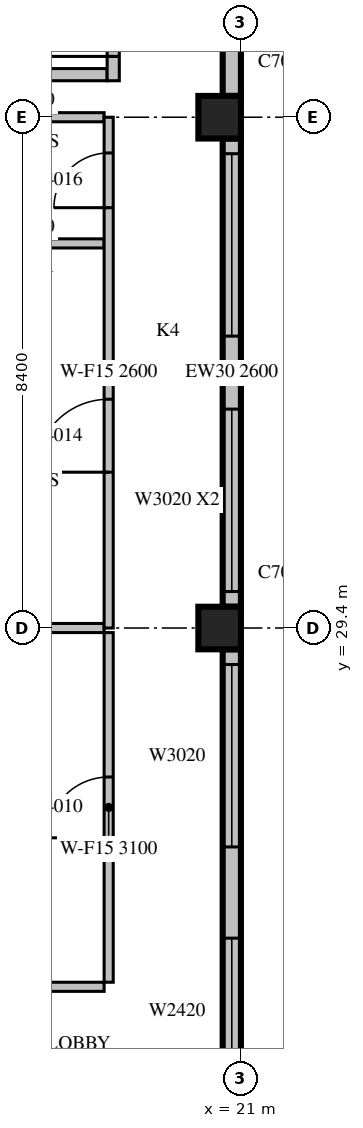
"""IFC4 building model, lengths in metres.
Left out: names, types, materials, properties, quantities, classifications, styles, units other than length and angle.
Written with IfcOpenShell. Run it as: python <this file> out.ifc"""

import sys

from ifc_helpers import new_model, si_unit, direction, frame, frame_2d, origin, origin_2d, place, context, subcontext, project, spatial, rectangle, extrude, source, transform, mapped, element, fill, save


model = new_model("IFC4")
c1 = context("Model", 3, precision=1e-05, world=origin(), true_north=direction((0.0, 1.0)))
c2 = subcontext(c1, "Body", "Model", "MODEL_VIEW")
j1 = project(units=[si_unit("LENGTHUNIT", "METRE"), si_unit("PLANEANGLEUNIT", "RADIAN")], contexts=[c1])
p1 = place(None, origin())
s1 = spatial("IfcSite", under=j1, at=p1, CompositionType="ELEMENT")
p2 = place(p1, origin())
s2 = spatial("IfcBuilding", under=s1, at=p2, CompositionType="ELEMENT")
p3 = place(p2, frame((0.0, 0.0, 284.5)))
s3 = spatial("IfcBuildingStorey", under=s2, at=p3, CompositionType="ELEMENT", Elevation=284.5)
m1 = source(origin(), c2, "Body", "SweptSolid", [
    extrude(rectangle(XDim=0.7, YDim=0.7, at=origin_2d()), origin(), (0.0, 0.0, 1.0), 3.5),
])
for number, where, z_axis, x_axis in (
    (1, (20.65, 29.4, 0.0), (0.0, 0.0, 1.0), (1.0, 0.0, 0.0)),
    (2, (20.65, 37.8, 0.0), (0.0, 0.0, 1.0), (1.0, 0.0, 0.0)),
):
    element("IfcColumn", number, at=place(p3, frame(where, z_axis=z_axis, x_axis=x_axis)), inside=s3, PredefinedType="COLUMN", context=c2, shape_type="MappedRepresentation", body=[
        mapped(m1, transform((0.0, 0.0, 0.0), scale=1.0)),
    ])
m2 = source(origin(), c2, "Body", "SweptSolid", [
    extrude(rectangle(XDim=7.45, YDim=0.3, at=frame_2d((3.725, 0.0))), origin(), (0.0, 0.0, 1.0), 3.1),
])
p4 = place(p3, frame((20.85, 21.6, 0.0), z_axis=(0.0, 0.0, 1.0), x_axis=(0.0, 1.0, 0.0)))
e3 = element("IfcWall", 3, at=p4, inside=s3, PredefinedType="STANDARD", context=c2, shape_type="MappedRepresentation", body=[
    mapped(m2, transform((0.0, 0.0, 0.0), scale=1.0)),
])
m3 = source(origin(), c2, "Body", "SweptSolid", [
    extrude(rectangle(XDim=2.4, YDim=2.0, at=frame_2d((1.2, 1.0))), frame((0.0, 0.16, 0.0), z_axis=(0.0, -1.0, 0.0), x_axis=(1.0, 0.0, 0.0)), (0.0, 0.0, 1.0), 0.32),
])
p5 = place(p4, frame((0.3, 0.0, 0.6)))
e4 = element("IfcOpeningElement", 4, at=p5, cuts=e3, PredefinedType="OPENING", context=c2, shape_type="MappedRepresentation", body=[
    mapped(m3, transform((0.0, 0.0, 0.0), scale=1.0)),
])
m4 = source(origin(), c2, "Body", "SweptSolid", [
    extrude(rectangle(XDim=3.0, YDim=2.0, at=frame_2d((1.5, 1.0))), frame((0.0, 0.16, 0.0), z_axis=(0.0, -1.0, 0.0), x_axis=(1.0, 0.0, 0.0)), (0.0, 0.0, 1.0), 0.32),
])
p6 = place(p4, frame((4.2, 0.0, 0.6)))
e5 = element("IfcOpeningElement", 5, at=p6, cuts=e3, PredefinedType="OPENING", context=c2, shape_type="MappedRepresentation", body=[
    mapped(m4, transform((0.0, 0.0, 0.0), scale=1.0)),
])
p7 = place(p3, frame((20.85, 29.75, 0.0), z_axis=(0.0, 0.0, 1.0), x_axis=(0.0, 1.0, 0.0)))
e6 = element("IfcWall", 6, at=p7, inside=s3, PredefinedType="STANDARD", context=c2, shape_type="SweptSolid", body=[
    extrude(rectangle(XDim=7.7, YDim=0.3, at=frame_2d((3.85, 0.0))), origin(), (0.0, 0.0, 1.0), 2.6),
])
p8 = place(p7, frame((0.25, 0.0, 0.6)))
e7 = element("IfcOpeningElement", 7, at=p8, cuts=e6, PredefinedType="OPENING", context=c2, shape_type="MappedRepresentation", body=[
    mapped(m4, transform((0.0, 0.0, 0.0), scale=1.0)),
])
p9 = place(p7, frame((4.45, 0.0, 0.6)))
e8 = element("IfcOpeningElement", 8, at=p9, cuts=e6, PredefinedType="OPENING", context=c2, shape_type="MappedRepresentation", body=[
    mapped(m4, transform((0.0, 0.0, 0.0), scale=1.0)),
])
p10 = place(p3, frame((20.85, 38.15, 0.0), z_axis=(0.0, 0.0, 1.0), x_axis=(0.0, 1.0, 0.0)))
e9 = element("IfcWall", 9, at=p10, inside=s3, PredefinedType="STANDARD", context=c2, shape_type="SweptSolid", body=[
    extrude(rectangle(XDim=5.53, YDim=0.3, at=frame_2d((2.765, 0.0))), origin(), (0.0, 0.0, 1.0), 3.1),
])
m5 = source(origin(), c2, "Body", "SweptSolid", [
    extrude(rectangle(XDim=3.6, YDim=2.0, at=frame_2d((1.8, 1.0))), frame((0.0, 0.16, 0.0), z_axis=(0.0, -1.0, 0.0), x_axis=(1.0, 0.0, 0.0)), (0.0, 0.0, 1.0), 0.32),
])
p11 = place(p10, frame((0.79, 0.0, 0.6)))
e10 = element("IfcOpeningElement", 10, at=p11, cuts=e9, PredefinedType="OPENING", context=c2, shape_type="MappedRepresentation", body=[
    mapped(m5, transform((0.0, 0.0, 0.0), scale=1.0)),
])
m6 = source(origin(), c2, "Body", "SweptSolid", [
    extrude(rectangle(XDim=8.0, YDim=0.2, at=frame_2d((4.0, 0.0))), origin(), (0.0, 0.0, 1.0), 3.1),
])
p12 = place(p3, frame((10.8, 38.5, 0.0), z_axis=(0.0, 0.0, 1.0), x_axis=(1.0, 0.0, 0.0)))
e11 = element("IfcWall", 11, at=p12, inside=s3, PredefinedType="PARTITIONING", context=c2, shape_type="MappedRepresentation", body=[
    mapped(m6, transform((0.0, 0.0, 0.0), scale=1.0)),
])
m7 = source(origin(), c2, "Body", "SweptSolid", [
    extrude(rectangle(XDim=5.45, YDim=0.2, at=frame_2d((2.725, 0.0))), origin(), (0.0, 0.0, 1.0), 3.1),
])
p13 = place(p3, frame((18.9, 38.4, 0.0), z_axis=(0.0, 0.0, 1.0), x_axis=(0.0, 1.0, 0.0)))
e12 = element("IfcWall", 12, at=p13, inside=s3, PredefinedType="PARTITIONING", context=c2, shape_type="MappedRepresentation", body=[
    mapped(m7, transform((0.0, 0.0, 0.0), scale=1.0)),
])
m8 = source(origin(), c2, "Body", "SweptSolid", [
    extrude(rectangle(XDim=1.2, YDim=2.1, at=frame_2d((0.6, 1.05))), frame((0.0, 0.11, 0.0), z_axis=(0.0, -1.0, 0.0), x_axis=(1.0, 0.0, 0.0)), (0.0, 0.0, 1.0), 0.22),
])
p14 = place(p13, frame((0.4, 0.0, 0.0)))
e13 = element("IfcOpeningElement", 13, at=p14, cuts=e12, PredefinedType="OPENING", context=c2, shape_type="MappedRepresentation", body=[
    mapped(m8, transform((0.0, 0.0, 0.0), scale=1.0)),
])
m9 = source(origin(), c2, "Body", "SweptSolid", [
    extrude(rectangle(XDim=0.9, YDim=2.1, at=frame_2d((0.45, 1.05))), frame((0.0, 0.11, 0.0), z_axis=(0.0, -1.0, 0.0), x_axis=(1.0, 0.0, 0.0)), (0.0, 0.0, 1.0), 0.22),
])
p15 = place(p13, frame((3.25, 0.0, 0.0)))
e14 = element("IfcOpeningElement", 14, at=p15, cuts=e12, PredefinedType="OPENING", context=c2, shape_type="MappedRepresentation", body=[
    mapped(m9, transform((0.0, 0.0, 0.0), scale=1.0)),
])
m10 = source(origin(), c2, "Body", "SweptSolid", [
    extrude(rectangle(XDim=4.575, YDim=0.15, at=frame_2d((2.288, 0.0))), origin(), (0.0, 0.0, 1.0), 3.1),
])
p16 = place(p3, frame((14.175, 23.5, 0.0), z_axis=(0.0, 0.0, 1.0), x_axis=(1.0, 0.0, 0.0)))
e15 = element("IfcWall", 15, at=p16, inside=s3, PredefinedType="PARTITIONING", context=c2, shape_type="MappedRepresentation", body=[
    mapped(m10, transform((0.0, 0.0, 0.0), scale=1.0)),
])
m11 = source(origin(), c2, "Body", "SweptSolid", [
    extrude(rectangle(XDim=0.9, YDim=2.1, at=frame_2d((0.45, 1.05))), frame((0.0, 0.085, 0.0), z_axis=(0.0, -1.0, 0.0), x_axis=(1.0, 0.0, 0.0)), (0.0, 0.0, 1.0), 0.17),
])
p17 = place(p16, frame((0.694, 0.0, 0.0)))
e16 = element("IfcOpeningElement", 16, at=p17, cuts=e15, PredefinedType="OPENING", context=c2, shape_type="MappedRepresentation", body=[
    mapped(m11, transform((0.0, 0.0, 0.0), scale=1.0)),
])
p18 = place(p3, frame((18.75, 29.4, 0.0), z_axis=(0.0, 0.0, 1.0), x_axis=(-1.0, 0.0, 0.0)))
e17 = element("IfcWall", 17, at=p18, inside=s3, PredefinedType="PARTITIONING", context=c2, shape_type="MappedRepresentation", body=[
    mapped(m10, transform((0.0, 0.0, 0.0), scale=1.0)),
])
m12 = source(origin(), c2, "Body", "SweptSolid", [
    extrude(rectangle(XDim=5.75, YDim=0.15, at=frame_2d((2.875, 0.0))), origin(), (0.0, 0.0, 1.0), 3.1),
])
p19 = place(p3, frame((18.825, 23.575, 0.0), z_axis=(0.0, 0.0, 1.0), x_axis=(0.0, 1.0, 0.0)))
e18 = element("IfcWall", 18, at=p19, inside=s3, PredefinedType="PARTITIONING", context=c2, shape_type="MappedRepresentation", body=[
    mapped(m12, transform((0.0, 0.0, 0.0), scale=1.0)),
])
m13 = source(origin(), c2, "Body", "SweptSolid", [
    extrude(rectangle(XDim=1.0, YDim=2.1, at=frame_2d((0.5, 1.05))), frame((0.0, 0.085, 0.0), z_axis=(0.0, -1.0, 0.0), x_axis=(1.0, 0.0, 0.0)), (0.0, 0.0, 1.0), 0.17),
])
p20 = place(p19, frame((2.375, 0.0, 0.0)))
e19 = element("IfcOpeningElement", 19, at=p20, cuts=e18, PredefinedType="OPENING", context=c2, shape_type="MappedRepresentation", body=[
    mapped(m13, transform((0.0, 0.0, 0.0), scale=1.0)),
])
m14 = source(origin(), c2, "Body", "SweptSolid", [
    extrude(rectangle(XDim=3.2, YDim=0.15, at=frame_2d((1.6, 0.0))), origin(), (0.0, 0.0, 1.0), 3.1),
])
for number, where, z_axis, x_axis in (
    (20, (18.75, 35.725, 0.0), (0.0, 0.0, 1.0), (-1.0, 0.0, 0.0)),
    (21, (18.75, 37.8, 0.0), (0.0, 0.0, 1.0), (-1.0, 0.0, 0.0)),
):
    element("IfcWall", number, at=place(p3, frame(where, z_axis=z_axis, x_axis=x_axis)), inside=s3, PredefinedType="PARTITIONING", context=c2, shape_type="MappedRepresentation", body=[
        mapped(m14, transform((0.0, 0.0, 0.0), scale=1.0)),
    ])
m15 = source(origin(), c2, "Body", "SweptSolid", [
    extrude(rectangle(XDim=8.4, YDim=0.15, at=frame_2d((4.2, 0.0))), origin(), (0.0, 0.0, 1.0), 2.6),
])
p21 = place(p3, frame((18.825, 29.4, 0.0), z_axis=(0.0, 0.0, 1.0), x_axis=(0.0, 1.0, 0.0)))
e22 = element("IfcWall", 22, at=p21, inside=s3, PredefinedType="PARTITIONING", context=c2, shape_type="MappedRepresentation", body=[
    mapped(m15, transform((0.0, 0.0, 0.0), scale=1.0)),
])
m16 = source(origin(), c2, "Body", "SweptSolid", [
    extrude(rectangle(XDim=1.2, YDim=2.1, at=frame_2d((0.6, 1.05))), frame((0.0, 0.085, 0.0), z_axis=(0.0, -1.0, 0.0), x_axis=(1.0, 0.0, 0.0)), (0.0, 0.0, 1.0), 0.17),
])
p22 = place(p21, frame((2.562, 0.0, 0.0)))
e23 = element("IfcOpeningElement", 23, at=p22, cuts=e22, PredefinedType="OPENING", context=c2, shape_type="MappedRepresentation", body=[
    mapped(m16, transform((0.0, 0.0, 0.0), scale=1.0)),
])
p23 = place(p21, frame((6.912, 0.0, 0.0)))
e24 = element("IfcOpeningElement", 24, at=p23, cuts=e22, PredefinedType="OPENING", context=c2, shape_type="MappedRepresentation", body=[
    mapped(m11, transform((0.0, 0.0, 0.0), scale=1.0)),
])
m17 = source(origin(), c2, "Body", "SweptSolid", [
    extrude(rectangle(XDim=2.4, YDim=2.0, at=frame_2d((1.2, 1.0))), frame((0.0, 0.03, 0.0), z_axis=(0.0, -1.0, 0.0), x_axis=(1.0, 0.0, 0.0)), (0.0, 0.0, 1.0), 0.06),
])
p24 = place(p5, origin())
e25 = element("IfcWindow", 25, at=p24, inside=s3, PartitioningType="SINGLE_PANEL", PredefinedType="WINDOW", context=c2, shape_type="MappedRepresentation", body=[
    mapped(m17, transform((0.0, 0.0, 0.0), scale=1.0)),
])
fill(e4, e25)
m18 = source(origin(), c2, "Body", "SweptSolid", [
    extrude(rectangle(XDim=3.0, YDim=2.0, at=frame_2d((1.5, 1.0))), frame((0.0, 0.03, 0.0), z_axis=(0.0, -1.0, 0.0), x_axis=(1.0, 0.0, 0.0)), (0.0, 0.0, 1.0), 0.06),
])
p25 = place(p6, origin())
e26 = element("IfcWindow", 26, at=p25, inside=s3, PartitioningType="SINGLE_PANEL", PredefinedType="WINDOW", context=c2, shape_type="MappedRepresentation", body=[
    mapped(m18, transform((0.0, 0.0, 0.0), scale=1.0)),
])
fill(e5, e26)
p26 = place(p8, origin())
e27 = element("IfcWindow", 27, at=p26, inside=s3, PartitioningType="SINGLE_PANEL", PredefinedType="WINDOW", context=c2, shape_type="MappedRepresentation", body=[
    mapped(m18, transform((0.0, 0.0, 0.0), scale=1.0)),
])
fill(e7, e27)
p27 = place(p9, origin())
e28 = element("IfcWindow", 28, at=p27, inside=s3, PartitioningType="SINGLE_PANEL", PredefinedType="WINDOW", context=c2, shape_type="MappedRepresentation", body=[
    mapped(m18, transform((0.0, 0.0, 0.0), scale=1.0)),
])
fill(e8, e28)
m19 = source(origin(), c2, "Body", "SweptSolid", [
    extrude(rectangle(XDim=1.2, YDim=2.1, at=frame_2d((0.6, 1.05))), frame((0.0, 0.025, 0.0), z_axis=(0.0, -1.0, 0.0), x_axis=(1.0, 0.0, 0.0)), (0.0, 0.0, 1.0), 0.05),
])
p28 = place(p14, origin())
e29 = element("IfcDoor", 29, at=p28, inside=s3, OperationType="SINGLE_SWING_LEFT", PredefinedType="DOOR", context=c2, shape_type="MappedRepresentation", body=[
    mapped(m19, transform((0.0, 0.0, 0.0), scale=1.0)),
])
fill(e13, e29)
m20 = source(origin(), c2, "Body", "SweptSolid", [
    extrude(rectangle(XDim=1.0, YDim=2.1, at=frame_2d((0.5, 1.05))), frame((0.0, 0.025, 0.0), z_axis=(0.0, -1.0, 0.0), x_axis=(1.0, 0.0, 0.0)), (0.0, 0.0, 1.0), 0.05),
])
p29 = place(p20, origin())
e30 = element("IfcDoor", 30, at=p29, inside=s3, OperationType="SINGLE_SWING_LEFT", PredefinedType="DOOR", context=c2, shape_type="MappedRepresentation", body=[
    mapped(m20, transform((0.0, 0.0, 0.0), scale=1.0)),
])
fill(e19, e30)
p30 = place(p22, origin())
e31 = element("IfcDoor", 31, at=p30, inside=s3, OperationType="SINGLE_SWING_LEFT", PredefinedType="DOOR", context=c2, shape_type="MappedRepresentation", body=[
    mapped(m19, transform((0.0, 0.0, 0.0), scale=1.0)),
])
fill(e23, e31)
m21 = source(origin(), c2, "Body", "SweptSolid", [
    extrude(rectangle(XDim=0.9, YDim=2.1, at=frame_2d((0.45, 1.05))), frame((0.0, 0.025, 0.0), z_axis=(0.0, -1.0, 0.0), x_axis=(1.0, 0.0, 0.0)), (0.0, 0.0, 1.0), 0.05),
])
p31 = place(p23, origin())
e32 = element("IfcDoor", 32, at=p31, inside=s3, OperationType="SINGLE_SWING_LEFT", PredefinedType="DOOR", context=c2, shape_type="MappedRepresentation", body=[
    mapped(m21, transform((0.0, 0.0, 0.0), scale=1.0)),
])
fill(e24, e32)
save(model, sys.argv[1])
